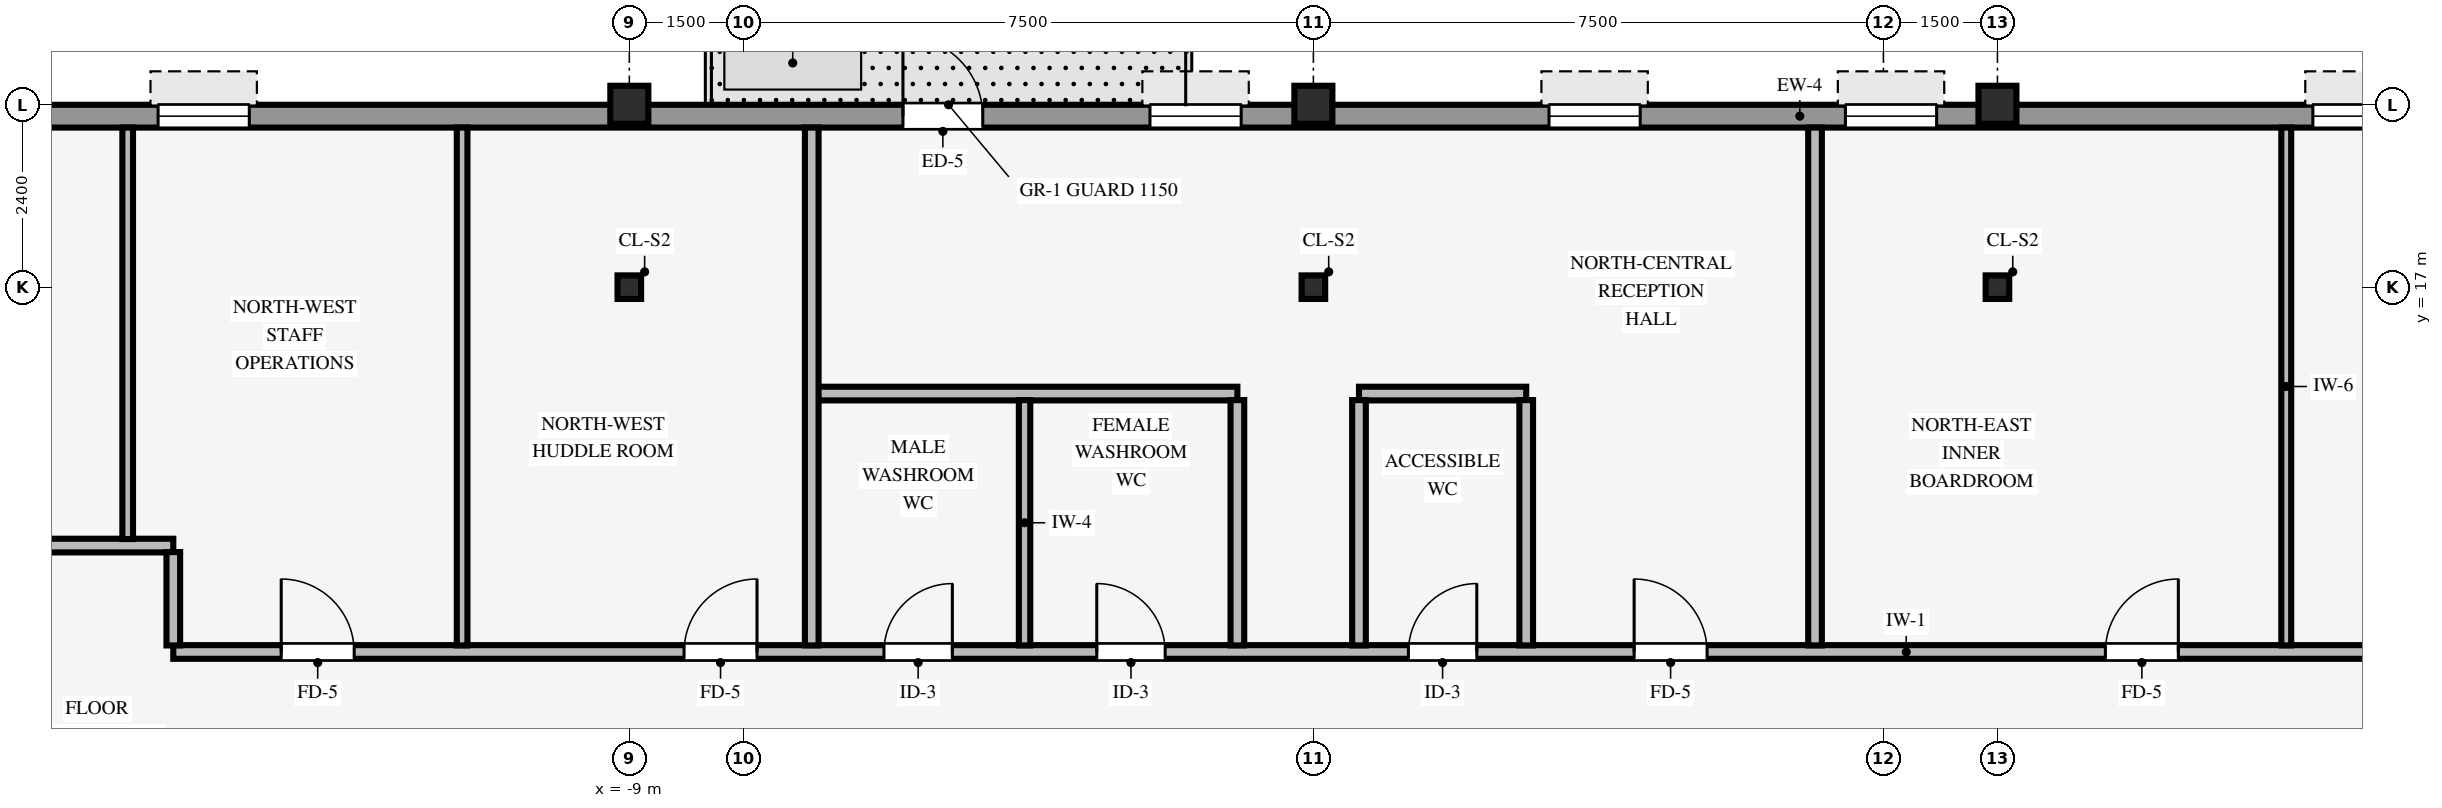
"""IFC4 building model, lengths in metres.
Left out: names, types, materials, properties, quantities, classifications, styles, units other than length and angle.
Written with IfcOpenShell. Run it as: python <this file> out.ifc"""

import sys

from ifc_helpers import new_model, si_unit, direction, frame, frame_2d, origin, origin_2d, place, context, subcontext, project, spatial, rectangle, hollow_rectangle, i_section, extrude, source, transform, mapped, element, fill, save


model = new_model("IFC4")
c1 = context("Model", 3, precision=1e-05, world=origin(), true_north=direction((0.0, 1.0)))
c2 = subcontext(c1, "Body", "Model", "MODEL_VIEW")
j1 = project(units=[si_unit("LENGTHUNIT", "METRE"), si_unit("PLANEANGLEUNIT", "RADIAN")], contexts=[c1])
p1 = place(None, origin())
s1 = spatial("IfcSite", under=j1, at=p1, CompositionType="ELEMENT")
p2 = place(p1, origin())
s2 = spatial("IfcBuilding", under=s1, at=p2, CompositionType="ELEMENT")
p3 = place(p2, frame((0.0, 0.0, 272.55)))
s3 = spatial("IfcBuildingStorey", under=s2, at=p3, CompositionType="ELEMENT", Elevation=272.55)
for number, where, z_axis, x_axis in (
    (1, (-9.0, 19.4, 0.0), (0.0, 0.0, 1.0), (1.0, 0.0, 0.0)),
    (2, (0.0, 19.4, 0.0), (0.0, 0.0, 1.0), (1.0, 0.0, 0.0)),
    (3, (9.0, 19.4, 0.0), (0.0, 0.0, 1.0), (1.0, 0.0, 0.0)),
):
    element("IfcColumn", number, at=place(p3, frame(where, z_axis=z_axis, x_axis=x_axis)), inside=s3, PredefinedType="COLUMN", context=c2, shape_type="SweptSolid", body=[
        extrude(hollow_rectangle(XDim=0.5, YDim=0.5, WallThickness=0.032, InnerFilletRadius=0.032, OuterFilletRadius=0.064, at=origin_2d()), origin(), (0.0, 0.0, 1.0), 3.37),
    ])
for number, where, z_axis, x_axis in (
    (4, (0.0, 17.0, 0.0), (0.0, 0.0, 1.0), (1.0, 0.0, 0.0)),
    (5, (-9.0, 17.0, 0.0), (0.0, 0.0, 1.0), (1.0, 0.0, 0.0)),
    (6, (9.0, 17.0, 0.0), (0.0, 0.0, 1.0), (1.0, 0.0, 0.0)),
):
    element("IfcColumn", number, at=place(p3, frame(where, z_axis=z_axis, x_axis=x_axis)), inside=s3, PredefinedType="COLUMN", context=c2, shape_type="SweptSolid", body=[
        extrude(i_section(OverallWidth=0.31, OverallDepth=0.31, WebThickness=0.015, FlangeThickness=0.015, FilletRadius=0.015, at=origin_2d()), origin(), (0.0, 0.0, 1.0), 3.37),
    ])
p4 = place(p3, frame((-18.9, 19.25, 0.0), z_axis=(0.0, 0.0, 1.0), x_axis=(1.0, 0.0, 0.0)))
e7 = element("IfcWall", 7, at=p4, inside=s3, PredefinedType="STANDARD", context=c2, shape_type="SweptSolid", body=[
    extrude(rectangle(XDim=35.6, YDim=0.3, at=frame_2d((17.8, 0.0))), origin(), (0.0, 0.0, 1.0), 2.705),
])
p5 = place(p4, frame((13.5, 0.0, 0.0)))
e8 = element("IfcOpeningElement", 8, at=p5, cuts=e7, PredefinedType="OPENING", context=c2, shape_type="SweptSolid", body=[
    extrude(rectangle(XDim=1.05, YDim=2.1, at=frame_2d((0.525, 1.05))), frame((0.0, 0.16, 0.0), z_axis=(0.0, -1.0, 0.0), x_axis=(1.0, 0.0, 0.0)), (0.0, 0.0, 1.0), 0.32),
])
p6 = place(p4, frame((3.7, 0.0, 0.8)))
e9 = element("IfcOpeningElement", 9, at=p6, cuts=e7, PredefinedType="OPENING", context=c2, shape_type="SweptSolid", body=[
    extrude(rectangle(XDim=1.2, YDim=1.48, at=frame_2d((0.6, 0.74))), frame((0.0, 0.16, 0.0), z_axis=(0.0, -1.0, 0.0), x_axis=(1.0, 0.0, 0.0)), (0.0, 0.0, 1.0), 0.32),
])
p7 = place(p4, frame((16.75, 0.0, 0.8)))
e10 = element("IfcOpeningElement", 10, at=p7, cuts=e7, PredefinedType="OPENING", context=c2, shape_type="SweptSolid", body=[
    extrude(rectangle(XDim=1.2, YDim=1.48, at=frame_2d((0.6, 0.74))), frame((0.0, 0.16, 0.0), z_axis=(0.0, -1.0, 0.0), x_axis=(1.0, 0.0, 0.0)), (0.0, 0.0, 1.0), 0.32),
])
p8 = place(p4, frame((22.0, 0.0, 0.8)))
e11 = element("IfcOpeningElement", 11, at=p8, cuts=e7, PredefinedType="OPENING", context=c2, shape_type="SweptSolid", body=[
    extrude(rectangle(XDim=1.2, YDim=1.48, at=frame_2d((0.6, 0.74))), frame((0.0, 0.16, 0.0), z_axis=(0.0, -1.0, 0.0), x_axis=(1.0, 0.0, 0.0)), (0.0, 0.0, 1.0), 0.32),
])
p9 = place(p4, frame((25.9, 0.0, 0.8)))
e12 = element("IfcOpeningElement", 12, at=p9, cuts=e7, PredefinedType="OPENING", context=c2, shape_type="SweptSolid", body=[
    extrude(rectangle(XDim=1.2, YDim=1.48, at=frame_2d((0.6, 0.74))), frame((0.0, 0.16, 0.0), z_axis=(0.0, -1.0, 0.0), x_axis=(1.0, 0.0, 0.0)), (0.0, 0.0, 1.0), 0.32),
])
p10 = place(p4, frame((32.05, 0.0, 0.8)))
e13 = element("IfcOpeningElement", 13, at=p10, cuts=e7, PredefinedType="OPENING", context=c2, shape_type="SweptSolid", body=[
    extrude(rectangle(XDim=1.2, YDim=1.48, at=frame_2d((0.6, 0.74))), frame((0.0, 0.16, 0.0), z_axis=(0.0, -1.0, 0.0), x_axis=(1.0, 0.0, 0.0)), (0.0, 0.0, 1.0), 0.32),
])
p11 = place(p3, frame((-15.0, 12.2, 0.0), z_axis=(0.0, 0.0, 1.0), x_axis=(1.0, 0.0, 0.0)))
e14 = element("IfcWall", 14, at=p11, inside=s3, PredefinedType="PARTITIONING", context=c2, shape_type="SweptSolid", body=[
    extrude(rectangle(XDim=30.8, YDim=0.18, at=frame_2d((15.4, 0.0))), origin(), (0.0, 0.0, 1.0), 3.36),
])
p12 = place(p11, frame((1.42, 0.0, 0.0)))
e15 = element("IfcOpeningElement", 15, at=p12, cuts=e14, PredefinedType="OPENING", context=c2, shape_type="SweptSolid", body=[
    extrude(rectangle(XDim=0.96, YDim=2.1, at=frame_2d((0.48, 1.05))), frame((0.0, 0.1, 0.0), z_axis=(0.0, -1.0, 0.0), x_axis=(1.0, 0.0, 0.0)), (0.0, 0.0, 1.0), 0.2),
])
p13 = place(p11, frame((25.42, 0.0, 0.0)))
e16 = element("IfcOpeningElement", 16, at=p13, cuts=e14, PredefinedType="OPENING", context=c2, shape_type="SweptSolid", body=[
    extrude(rectangle(XDim=0.96, YDim=2.1, at=frame_2d((0.48, 1.05))), frame((0.0, 0.1, 0.0), z_axis=(0.0, -1.0, 0.0), x_axis=(1.0, 0.0, 0.0)), (0.0, 0.0, 1.0), 0.2),
])
p14 = place(p11, frame((19.22, 0.0, 0.0)))
e17 = element("IfcOpeningElement", 17, at=p14, cuts=e14, PredefinedType="OPENING", context=c2, shape_type="SweptSolid", body=[
    extrude(rectangle(XDim=0.96, YDim=2.1, at=frame_2d((0.48, 1.05))), frame((0.0, 0.1, 0.0), z_axis=(0.0, -1.0, 0.0), x_axis=(1.0, 0.0, 0.0)), (0.0, 0.0, 1.0), 0.2),
])
p15 = place(p11, frame((28.82, 0.0, 0.0)))
e18 = element("IfcOpeningElement", 18, at=p15, cuts=e14, PredefinedType="OPENING", context=c2, shape_type="SweptSolid", body=[
    extrude(rectangle(XDim=0.96, YDim=2.1, at=frame_2d((0.48, 1.05))), frame((0.0, 0.1, 0.0), z_axis=(0.0, -1.0, 0.0), x_axis=(1.0, 0.0, 0.0)), (0.0, 0.0, 1.0), 0.2),
])
p16 = place(p11, frame((9.35, 0.0, 0.0)))
e19 = element("IfcOpeningElement", 19, at=p16, cuts=e14, PredefinedType="OPENING", context=c2, shape_type="SweptSolid", body=[
    extrude(rectangle(XDim=0.9, YDim=2.1, at=frame_2d((0.45, 1.05))), frame((0.0, 0.1, 0.0), z_axis=(0.0, -1.0, 0.0), x_axis=(1.0, 0.0, 0.0)), (0.0, 0.0, 1.0), 0.2),
])
p17 = place(p11, frame((12.15, 0.0, 0.0)))
e20 = element("IfcOpeningElement", 20, at=p17, cuts=e14, PredefinedType="OPENING", context=c2, shape_type="SweptSolid", body=[
    extrude(rectangle(XDim=0.9, YDim=2.1, at=frame_2d((0.45, 1.05))), frame((0.0, 0.1, 0.0), z_axis=(0.0, -1.0, 0.0), x_axis=(1.0, 0.0, 0.0)), (0.0, 0.0, 1.0), 0.2),
])
p18 = place(p11, frame((6.72, 0.0, 0.0)))
e21 = element("IfcOpeningElement", 21, at=p18, cuts=e14, PredefinedType="OPENING", context=c2, shape_type="SweptSolid", body=[
    extrude(rectangle(XDim=0.96, YDim=2.1, at=frame_2d((0.48, 1.05))), frame((0.0, 0.1, 0.0), z_axis=(0.0, -1.0, 0.0), x_axis=(1.0, 0.0, 0.0)), (0.0, 0.0, 1.0), 0.2),
])
p19 = place(p11, frame((16.25, 0.0, 0.0)))
e22 = element("IfcOpeningElement", 22, at=p19, cuts=e14, PredefinedType="OPENING", context=c2, shape_type="SweptSolid", body=[
    extrude(rectangle(XDim=0.9, YDim=2.1, at=frame_2d((0.45, 1.05))), frame((0.0, 0.1, 0.0), z_axis=(0.0, -1.0, 0.0), x_axis=(1.0, 0.0, 0.0)), (0.0, 0.0, 1.0), 0.2),
])
p20 = place(p3, frame((-20.0, 13.6, 0.0), z_axis=(0.0, 0.0, 1.0), x_axis=(1.0, 0.0, 0.0)))
e23 = element("IfcWall", 23, at=p20, inside=s3, PredefinedType="PARTITIONING", context=c2, shape_type="SweptSolid", body=[
    extrude(rectangle(XDim=5.0, YDim=0.18, at=frame_2d((2.5, 0.0))), origin(), (0.0, 0.0, 1.0), 3.038),
])
p21 = place(p20, frame((1.72, 0.0, 0.0)))
e24 = element("IfcOpeningElement", 24, at=p21, cuts=e23, PredefinedType="OPENING", context=c2, shape_type="SweptSolid", body=[
    extrude(rectangle(XDim=0.96, YDim=2.1, at=frame_2d((0.48, 1.05))), frame((0.0, 0.1, 0.0), z_axis=(0.0, -1.0, 0.0), x_axis=(1.0, 0.0, 0.0)), (0.0, 0.0, 1.0), 0.2),
])
p22 = place(p3, frame((-6.529, 15.6, 0.0), z_axis=(0.0, 0.0, 1.0), x_axis=(1.0, 0.0, 0.0)))
e25 = element("IfcWall", 25, at=p22, inside=s3, PredefinedType="PARTITIONING", context=c2, shape_type="SweptSolid", body=[
    extrude(rectangle(XDim=5.529, YDim=0.18, at=frame_2d((2.765, 0.0))), origin(), (0.0, 0.0, 1.0), 3.36),
])
p23 = place(p3, frame((0.6, 15.6, 0.0), z_axis=(0.0, 0.0, 1.0), x_axis=(1.0, 0.0, 0.0)))
e26 = element("IfcWall", 26, at=p23, inside=s3, PredefinedType="PARTITIONING", context=c2, shape_type="SweptSolid", body=[
    extrude(rectangle(XDim=2.2, YDim=0.18, at=frame_2d((1.1, 0.0))), origin(), (0.0, 0.0, 1.0), 3.36),
])
p24 = place(p3, frame((-15.6, 13.686, 0.0), z_axis=(0.0, 0.0, 1.0), x_axis=(0.0, 1.0, 0.0)))
e27 = element("IfcWall", 27, at=p24, inside=s3, PredefinedType="PARTITIONING", context=c2, shape_type="SweptSolid", body=[
    extrude(rectangle(XDim=5.414, YDim=0.14, at=frame_2d((2.707, 0.0))), origin(), (0.0, 0.0, 1.0), 3.36),
])
p25 = place(p3, frame((-15.0, 12.286, 0.0), z_axis=(0.0, 0.0, 1.0), x_axis=(0.0, 1.0, 0.0)))
e28 = element("IfcWall", 28, at=p25, inside=s3, PredefinedType="PARTITIONING", context=c2, shape_type="SweptSolid", body=[
    extrude(rectangle(XDim=1.228, YDim=0.18, at=frame_2d((0.614, 0.0))), origin(), (0.0, 0.0, 1.0), 3.36),
])
p26 = place(p3, frame((-11.2, 12.286, 0.0), z_axis=(0.0, 0.0, 1.0), x_axis=(0.0, 1.0, 0.0)))
e29 = element("IfcWall", 29, at=p26, inside=s3, PredefinedType="PARTITIONING", context=c2, shape_type="SweptSolid", body=[
    extrude(rectangle(XDim=6.814, YDim=0.14, at=frame_2d((3.407, 0.0))), origin(), (0.0, 0.0, 1.0), 3.36),
])
p27 = place(p3, frame((-6.6, 12.286, 0.0), z_axis=(0.0, 0.0, 1.0), x_axis=(0.0, 1.0, 0.0)))
e30 = element("IfcWall", 30, at=p27, inside=s3, PredefinedType="PARTITIONING", context=c2, shape_type="SweptSolid", body=[
    extrude(rectangle(XDim=6.814, YDim=0.18, at=frame_2d((3.407, 0.0))), origin(), (0.0, 0.0, 1.0), 3.36),
])
p28 = place(p3, frame((-3.8, 12.286, 0.0), z_axis=(0.0, 0.0, 1.0), x_axis=(0.0, 1.0, 0.0)))
e31 = element("IfcWall", 31, at=p28, inside=s3, PredefinedType="PARTITIONING", context=c2, shape_type="SweptSolid", body=[
    extrude(rectangle(XDim=3.228, YDim=0.15, at=frame_2d((1.614, 0.0))), origin(), (0.0, 0.0, 1.0), 3.36),
])
for number, where, z_axis, x_axis in (
    (32, (-1.0, 12.286, 0.0), (0.0, 0.0, 1.0), (0.0, 1.0, 0.0)),
    (33, (0.6, 12.286, 0.0), (0.0, 0.0, 1.0), (0.0, 1.0, 0.0)),
    (34, (2.8, 12.286, 0.0), (0.0, 0.0, 1.0), (0.0, 1.0, 0.0)),
):
    element("IfcWall", number, at=place(p3, frame(where, z_axis=z_axis, x_axis=x_axis)), inside=s3, PredefinedType="PARTITIONING", context=c2, shape_type="SweptSolid", body=[
        extrude(rectangle(XDim=3.228, YDim=0.18, at=frame_2d((1.614, 0.0))), origin(), (0.0, 0.0, 1.0), 3.36),
    ])
p29 = place(p3, frame((6.6, 12.286, 0.0), z_axis=(0.0, 0.0, 1.0), x_axis=(0.0, 1.0, 0.0)))
e35 = element("IfcWall", 35, at=p29, inside=s3, PredefinedType="PARTITIONING", context=c2, shape_type="SweptSolid", body=[
    extrude(rectangle(XDim=6.814, YDim=0.18, at=frame_2d((3.407, 0.0))), origin(), (0.0, 0.0, 1.0), 3.36),
])
p30 = place(p3, frame((12.8, 12.286, 0.0), z_axis=(0.0, 0.0, 1.0), x_axis=(0.0, 1.0, 0.0)))
e36 = element("IfcWall", 36, at=p30, inside=s3, PredefinedType="PARTITIONING", context=c2, shape_type="SweptSolid", body=[
    extrude(rectangle(XDim=6.814, YDim=0.13, at=frame_2d((3.407, 0.0))), origin(), (0.0, 0.0, 1.0), 3.36),
])
m1 = source(origin(), c2, "Body", "SweptSolid", [
    extrude(rectangle(XDim=1.05, YDim=2.1, at=frame_2d((0.525, 1.05))), frame((0.0, 0.025, 0.0), z_axis=(0.0, -1.0, 0.0), x_axis=(1.0, 0.0, 0.0)), (0.0, 0.0, 1.0), 0.05),
])
p31 = place(p5, origin())
e37 = element("IfcDoor", 37, at=p31, inside=s3, OperationType="SINGLE_SWING_LEFT", PredefinedType="DOOR", context=c2, shape_type="MappedRepresentation", body=[
    mapped(m1, transform((0.0, 0.0, 0.0), scale=1.0)),
])
fill(e8, e37)
m2 = source(origin(), c2, "Body", "SweptSolid", [
    extrude(rectangle(XDim=1.2, YDim=1.48, at=frame_2d((0.6, 0.74))), frame((0.0, 0.03, 0.0), z_axis=(0.0, -1.0, 0.0), x_axis=(1.0, 0.0, 0.0)), (0.0, 0.0, 1.0), 0.06),
])
p32 = place(p6, origin())
e38 = element("IfcWindow", 38, at=p32, inside=s3, PartitioningType="SINGLE_PANEL", PredefinedType="WINDOW", context=c2, shape_type="MappedRepresentation", body=[
    mapped(m2, transform((0.0, 0.0, 0.0), scale=1.0)),
])
fill(e9, e38)
p33 = place(p7, origin())
e39 = element("IfcWindow", 39, at=p33, inside=s3, PartitioningType="SINGLE_PANEL", PredefinedType="WINDOW", context=c2, shape_type="MappedRepresentation", body=[
    mapped(m2, transform((0.0, 0.0, 0.0), scale=1.0)),
])
fill(e10, e39)
p34 = place(p8, origin())
e40 = element("IfcWindow", 40, at=p34, inside=s3, PartitioningType="SINGLE_PANEL", PredefinedType="WINDOW", context=c2, shape_type="MappedRepresentation", body=[
    mapped(m2, transform((0.0, 0.0, 0.0), scale=1.0)),
])
fill(e11, e40)
p35 = place(p9, origin())
e41 = element("IfcWindow", 41, at=p35, inside=s3, PartitioningType="SINGLE_PANEL", PredefinedType="WINDOW", context=c2, shape_type="MappedRepresentation", body=[
    mapped(m2, transform((0.0, 0.0, 0.0), scale=1.0)),
])
fill(e12, e41)
p36 = place(p10, origin())
e42 = element("IfcWindow", 42, at=p36, inside=s3, PartitioningType="SINGLE_PANEL", PredefinedType="WINDOW", context=c2, shape_type="MappedRepresentation", body=[
    mapped(m2, transform((0.0, 0.0, 0.0), scale=1.0)),
])
fill(e13, e42)
m3 = source(origin(), c2, "Body", "SweptSolid", [
    extrude(rectangle(XDim=0.96, YDim=2.1, at=frame_2d((0.48, 1.05))), frame((0.0, 0.025, 0.0), z_axis=(0.0, -1.0, 0.0), x_axis=(1.0, 0.0, 0.0)), (0.0, 0.0, 1.0), 0.05),
])
p37 = place(p12, origin())
e43 = element("IfcDoor", 43, at=p37, inside=s3, OperationType="SINGLE_SWING_LEFT", PredefinedType="DOOR", context=c2, shape_type="MappedRepresentation", body=[
    mapped(m3, transform((0.0, 0.0, 0.0), scale=1.0)),
])
fill(e15, e43)
p38 = place(p13, origin())
e44 = element("IfcDoor", 44, at=p38, inside=s3, OperationType="SINGLE_SWING_RIGHT", PredefinedType="DOOR", context=c2, shape_type="MappedRepresentation", body=[
    mapped(m3, transform((0.0, 0.0, 0.0), scale=1.0)),
])
fill(e16, e44)
p39 = place(p14, origin())
e45 = element("IfcDoor", 45, at=p39, inside=s3, OperationType="SINGLE_SWING_LEFT", PredefinedType="DOOR", context=c2, shape_type="MappedRepresentation", body=[
    mapped(m3, transform((0.0, 0.0, 0.0), scale=1.0)),
])
fill(e17, e45)
m4 = source(origin(), c2, "Body", "SweptSolid", [
    extrude(rectangle(XDim=0.9, YDim=2.1, at=frame_2d((0.45, 1.05))), frame((0.0, 0.025, 0.0), z_axis=(0.0, -1.0, 0.0), x_axis=(1.0, 0.0, 0.0)), (0.0, 0.0, 1.0), 0.05),
])
p40 = place(p16, origin())
e46 = element("IfcDoor", 46, at=p40, inside=s3, OperationType="SINGLE_SWING_RIGHT", PredefinedType="DOOR", context=c2, shape_type="MappedRepresentation", body=[
    mapped(m4, transform((0.0, 0.0, 0.0), scale=1.0)),
])
fill(e19, e46)
p41 = place(p17, origin())
e47 = element("IfcDoor", 47, at=p41, inside=s3, OperationType="SINGLE_SWING_LEFT", PredefinedType="DOOR", context=c2, shape_type="MappedRepresentation", body=[
    mapped(m4, transform((0.0, 0.0, 0.0), scale=1.0)),
])
fill(e20, e47)
p42 = place(p18, origin())
e48 = element("IfcDoor", 48, at=p42, inside=s3, OperationType="SINGLE_SWING_RIGHT", PredefinedType="DOOR", context=c2, shape_type="MappedRepresentation", body=[
    mapped(m3, transform((0.0, 0.0, 0.0), scale=1.0)),
])
fill(e21, e48)
p43 = place(p19, origin())
e49 = element("IfcDoor", 49, at=p43, inside=s3, OperationType="SINGLE_SWING_RIGHT", PredefinedType="DOOR", context=c2, shape_type="MappedRepresentation", body=[
    mapped(m4, transform((0.0, 0.0, 0.0), scale=1.0)),
])
fill(e22, e49)
save(model, sys.argv[1])
